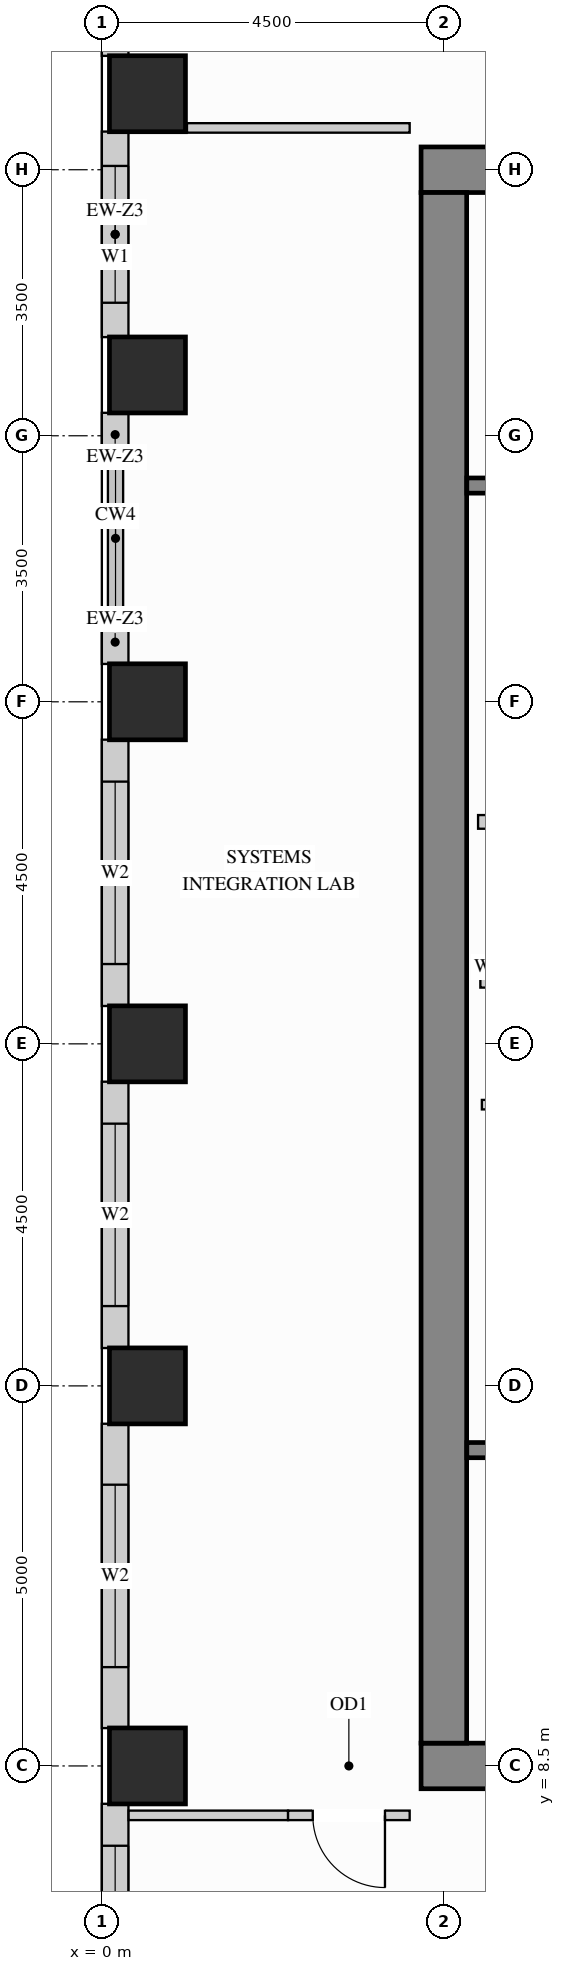
"""IFC4 building model, lengths in metres.
Left out: names, types, materials, properties, quantities, classifications, styles, units other than length and angle.
Written with IfcOpenShell. Run it as: python <this file> out.ifc"""

import sys

from ifc_helpers import new_model, si_unit, direction, frame, frame_2d, origin, origin_2d, place, context, subcontext, project, spatial, rectangle, extrude, source, transform, mapped, element, fill, save


model = new_model("IFC4")
c1 = context("Model", 3, precision=1e-05, world=origin(), true_north=direction((0.0, 1.0)))
c2 = subcontext(c1, "Body", "Model", "MODEL_VIEW")
j1 = project(units=[si_unit("LENGTHUNIT", "METRE"), si_unit("PLANEANGLEUNIT", "RADIAN")], contexts=[c1])
p1 = place(None, origin())
s1 = spatial("IfcSite", under=j1, at=p1, CompositionType="ELEMENT")
p2 = place(p1, origin())
s2 = spatial("IfcBuilding", under=s1, at=p2, CompositionType="ELEMENT")
p3 = place(p2, frame((0.0, 0.0, 143.1)))
s3 = spatial("IfcBuildingStorey", under=s2, at=p3, CompositionType="ELEMENT", Elevation=143.1)
m1 = source(origin(), c2, "Body", "SweptSolid", [
    extrude(rectangle(XDim=1.0, YDim=1.0, at=origin_2d()), origin(), (0.0, 0.0, 1.0), 3.4),
])
for number, where, z_axis, x_axis in (
    (1, (0.6, 13.5, 0.0), (0.0, 0.0, 1.0), (1.0, 0.0, 0.0)),
    (2, (0.6, 18.0, 0.0), (0.0, 0.0, 1.0), (1.0, 0.0, 0.0)),
    (3, (0.6, 22.5, 0.0), (0.0, 0.0, 1.0), (1.0, 0.0, 0.0)),
    (4, (0.6, 26.8, 0.0), (0.0, 0.0, 1.0), (1.0, 0.0, 0.0)),
    (5, (0.6, 30.5, 0.0), (0.0, 0.0, 1.0), (1.0, 0.0, 0.0)),
    (6, (0.6, 8.5, 0.0), (0.0, 0.0, 1.0), (1.0, 0.0, 0.0)),
):
    element("IfcColumn", number, at=place(p3, frame(where, z_axis=z_axis, x_axis=x_axis)), inside=s3, PredefinedType="COLUMN", context=c2, shape_type="MappedRepresentation", body=[
        mapped(m1, transform((0.0, 0.0, 0.0), x_axis=(1.0, 0.0, 0.0), y_axis=(0.0, 1.0, 0.0), z_axis=(0.0, 0.0, 1.0))),
    ])
m2 = source(origin(), c2, "Body", "SweptSolid", [
    extrude(rectangle(XDim=10.6, YDim=0.6, at=frame_2d((5.3, 0.0))), origin(), (0.0, 0.0, 1.0), 3.4),
])
for number, where, z_axis, x_axis in (
    (7, (4.2, 29.5, 0.0), (0.0, 0.0, 1.0), (1.0, 0.0, 0.0)),
    (8, (4.2, 8.5, 0.0), (0.0, 0.0, 1.0), (1.0, 0.0, 0.0)),
):
    element("IfcWall", number, at=place(p3, frame(where, z_axis=z_axis, x_axis=x_axis)), inside=s3, PredefinedType="SHEAR", context=c2, shape_type="MappedRepresentation", body=[
        mapped(m2, transform((0.0, 0.0, 0.0), x_axis=(1.0, 0.0, 0.0), y_axis=(0.0, 1.0, 0.0), z_axis=(0.0, 0.0, 1.0))),
    ])
m3 = source(origin(), c2, "Body", "SweptSolid", [
    extrude(rectangle(XDim=20.4, YDim=0.6, at=frame_2d((10.2, 0.0))), origin(), (0.0, 0.0, 1.0), 3.4),
])
p4 = place(p3, frame((4.5, 8.8, 0.0), z_axis=(0.0, 0.0, 1.0), x_axis=(0.0, 1.0, 0.0)))
e9 = element("IfcWall", 9, at=p4, inside=s3, PredefinedType="SHEAR", context=c2, shape_type="MappedRepresentation", body=[
    mapped(m3, transform((0.0, 0.0, 0.0), x_axis=(1.0, 0.0, 0.0), y_axis=(0.0, 1.0, 0.0), z_axis=(0.0, 0.0, 1.0))),
])
p5 = place(p3, frame((0.175, 34.502, 0.0), z_axis=(0.0, 0.0, 1.0), x_axis=(0.0, -1.0, 0.0)))
e10 = element("IfcWall", 10, at=p5, inside=s3, PredefinedType="SOLIDWALL", context=c2, shape_type="SweptSolid", body=[
    extrude(rectangle(XDim=3.504, YDim=0.35, at=frame_2d((1.752, 0.0))), origin(), (0.0, 0.0, 1.0), 2.612),
])
p6 = place(p5, frame((0.561, 0.0, 0.78)))
e11 = element("IfcOpeningElement", 11, at=p6, cuts=e10, PredefinedType="OPENING", context=c2, shape_type="SweptSolid", body=[
    extrude(rectangle(XDim=1.8, YDim=1.652, at=frame_2d((0.9, 0.826))), frame((0.0, 0.185, 0.0), z_axis=(0.0, -1.0, 0.0), x_axis=(1.0, 0.0, 0.0)), (0.0, 0.0, 1.0), 0.37),
])
p7 = place(p3, frame((0.175, 30.002, 0.0), z_axis=(0.0, 0.0, 1.0), x_axis=(0.0, -1.0, 0.0)))
e12 = element("IfcWall", 12, at=p7, inside=s3, PredefinedType="SOLIDWALL", context=c2, shape_type="SweptSolid", body=[
    extrude(rectangle(XDim=2.704, YDim=0.35, at=frame_2d((1.352, 0.0))), origin(), (0.0, 0.0, 1.0), 2.612),
])
p8 = place(p7, frame((0.452, 0.0, 0.78)))
e13 = element("IfcOpeningElement", 13, at=p8, cuts=e12, PredefinedType="OPENING", context=c2, shape_type="SweptSolid", body=[
    extrude(rectangle(XDim=1.8, YDim=1.652, at=frame_2d((0.9, 0.826))), frame((0.0, 0.185, 0.0), z_axis=(0.0, -1.0, 0.0), x_axis=(1.0, 0.0, 0.0)), (0.0, 0.0, 1.0), 0.37),
])
m4 = source(origin(), c2, "Body", "SweptSolid", [
    extrude(rectangle(XDim=0.452, YDim=0.35, at=frame_2d((0.226, 0.0))), origin(), (0.0, 0.0, 1.0), 2.612),
])
for number, where, z_axis, x_axis in (
    (14, (0.175, 26.302, 0.0), (0.0, 0.0, 1.0), (0.0, -1.0, 0.0)),
    (15, (0.175, 23.45, 0.0), (0.0, 0.0, 1.0), (0.0, -1.0, 0.0)),
):
    element("IfcWall", number, at=place(p3, frame(where, z_axis=z_axis, x_axis=x_axis)), inside=s3, PredefinedType="SOLIDWALL", context=c2, shape_type="MappedRepresentation", body=[
        mapped(m4, transform((0.0, 0.0, 0.0), x_axis=(1.0, 0.0, 0.0), y_axis=(0.0, 1.0, 0.0), z_axis=(0.0, 0.0, 1.0))),
    ])
p9 = place(p3, frame((0.175, 22.002, 0.0), z_axis=(0.0, 0.0, 1.0), x_axis=(0.0, -1.0, 0.0)))
e16 = element("IfcWall", 16, at=p9, inside=s3, PredefinedType="SOLIDWALL", context=c2, shape_type="SweptSolid", body=[
    extrude(rectangle(XDim=3.504, YDim=0.35, at=frame_2d((1.752, 0.0))), origin(), (0.0, 0.0, 1.0), 2.612),
])
p10 = place(p9, frame((0.552, 0.0, 0.78)))
e17 = element("IfcOpeningElement", 17, at=p10, cuts=e16, PredefinedType="OPENING", context=c2, shape_type="SweptSolid", body=[
    extrude(rectangle(XDim=2.4, YDim=1.652, at=frame_2d((1.2, 0.826))), frame((0.0, 0.185, 0.0), z_axis=(0.0, -1.0, 0.0), x_axis=(1.0, 0.0, 0.0)), (0.0, 0.0, 1.0), 0.37),
])
p11 = place(p3, frame((0.175, 17.502, 0.0), z_axis=(0.0, 0.0, 1.0), x_axis=(0.0, -1.0, 0.0)))
e18 = element("IfcWall", 18, at=p11, inside=s3, PredefinedType="SOLIDWALL", context=c2, shape_type="SweptSolid", body=[
    extrude(rectangle(XDim=3.504, YDim=0.35, at=frame_2d((1.752, 0.0))), origin(), (0.0, 0.0, 1.0), 2.612),
])
p12 = place(p11, frame((0.552, 0.0, 0.78)))
e19 = element("IfcOpeningElement", 19, at=p12, cuts=e18, PredefinedType="OPENING", context=c2, shape_type="SweptSolid", body=[
    extrude(rectangle(XDim=2.4, YDim=1.652, at=frame_2d((1.2, 0.826))), frame((0.0, 0.185, 0.0), z_axis=(0.0, -1.0, 0.0), x_axis=(1.0, 0.0, 0.0)), (0.0, 0.0, 1.0), 0.37),
])
p13 = place(p3, frame((0.175, 13.002, 0.0), z_axis=(0.0, 0.0, 1.0), x_axis=(0.0, -1.0, 0.0)))
e20 = element("IfcWall", 20, at=p13, inside=s3, PredefinedType="SOLIDWALL", context=c2, shape_type="SweptSolid", body=[
    extrude(rectangle(XDim=4.004, YDim=0.35, at=frame_2d((2.002, 0.0))), origin(), (0.0, 0.0, 1.0), 2.612),
])
p14 = place(p13, frame((0.802, 0.0, 0.78)))
e21 = element("IfcOpeningElement", 21, at=p14, cuts=e20, PredefinedType="OPENING", context=c2, shape_type="SweptSolid", body=[
    extrude(rectangle(XDim=2.4, YDim=1.652, at=frame_2d((1.2, 0.826))), frame((0.0, 0.185, 0.0), z_axis=(0.0, -1.0, 0.0), x_axis=(1.0, 0.0, 0.0)), (0.0, 0.0, 1.0), 0.37),
])
p15 = place(p3, frame((0.175, 8.002, 0.0), z_axis=(0.0, 0.0, 1.0), x_axis=(0.0, -1.0, 0.0)))
e22 = element("IfcWall", 22, at=p15, inside=s3, PredefinedType="SOLIDWALL", context=c2, shape_type="SweptSolid", body=[
    extrude(rectangle(XDim=4.004, YDim=0.35, at=frame_2d((2.002, 0.0))), origin(), (0.0, 0.0, 1.0), 2.612),
])
p16 = place(p15, frame((0.552, 0.0, 0.78)))
e23 = element("IfcOpeningElement", 23, at=p16, cuts=e22, PredefinedType="OPENING", context=c2, shape_type="SweptSolid", body=[
    extrude(rectangle(XDim=2.4, YDim=1.652, at=frame_2d((1.2, 0.826))), frame((0.0, 0.185, 0.0), z_axis=(0.0, -1.0, 0.0), x_axis=(1.0, 0.0, 0.0)), (0.0, 0.0, 1.0), 0.37),
])
m5 = source(origin(), c2, "Body", "SweptSolid", [
    extrude(rectangle(XDim=2.2, YDim=0.18, at=frame_2d((1.1, 0.0))), origin(), (0.0, 0.0, 1.0), 3.385),
])
p17 = place(p3, frame((4.95, 20.92, 0.0), z_axis=(0.0, 0.0, 1.0), x_axis=(1.0, 0.0, 0.0)))
e24 = element("IfcWall", 24, at=p17, inside=s3, PredefinedType="PARTITIONING", context=c2, shape_type="MappedRepresentation", body=[
    mapped(m5, transform((0.0, 0.0, 0.0), x_axis=(1.0, 0.0, 0.0), y_axis=(0.0, 1.0, 0.0), z_axis=(0.0, 0.0, 1.0))),
])
p18 = place(p3, frame((5.0, 17.2, 0.0), z_axis=(0.0, 0.0, 1.0), x_axis=(1.0, 0.0, 0.0)))
e25 = element("IfcWall", 25, at=p18, inside=s3, PredefinedType="PARTITIONING", context=c2, shape_type="SweptSolid", body=[
    extrude(rectangle(XDim=2.4, YDim=0.125, at=frame_2d((1.2, 0.0))), origin(), (0.0, 0.0, 1.0), 3.385),
])
p19 = place(p18, frame((0.7, 0.0, 0.0)))
e26 = element("IfcOpeningElement", 26, at=p19, cuts=e25, PredefinedType="OPENING", context=c2, shape_type="SweptSolid", body=[
    extrude(rectangle(XDim=0.85, YDim=2.1, at=frame_2d((0.425, 1.05))), frame((0.0, 0.073, 0.0), z_axis=(0.0, -1.0, 0.0), x_axis=(1.0, 0.0, 0.0)), (0.0, 0.0, 1.0), 0.145),
])
m6 = source(origin(), c2, "Body", "SweptSolid", [
    extrude(rectangle(XDim=2.93, YDim=0.125, at=frame_2d((1.465, 0.0))), origin(), (0.0, 0.0, 1.0), 3.385),
])
p20 = place(p3, frame((1.12, 30.05, 0.0), z_axis=(0.0, 0.0, 1.0), x_axis=(1.0, 0.0, 0.0)))
e27 = element("IfcWall", 27, at=p20, inside=s3, PredefinedType="PARTITIONING", context=c2, shape_type="MappedRepresentation", body=[
    mapped(m6, transform((0.0, 0.0, 0.0), x_axis=(1.0, 0.0, 0.0), y_axis=(0.0, 1.0, 0.0), z_axis=(0.0, 0.0, 1.0))),
])
m7 = source(origin(), c2, "Body", "SweptSolid", [
    extrude(rectangle(XDim=2.098, YDim=0.125, at=frame_2d((1.049, 0.0))), origin(), (0.0, 0.0, 1.0), 3.385),
])
p21 = place(p3, frame((0.352, 7.85, 0.0), z_axis=(0.0, 0.0, 1.0), x_axis=(1.0, 0.0, 0.0)))
e28 = element("IfcWall", 28, at=p21, inside=s3, PredefinedType="PARTITIONING", context=c2, shape_type="MappedRepresentation", body=[
    mapped(m7, transform((0.0, 0.0, 0.0), x_axis=(1.0, 0.0, 0.0), y_axis=(0.0, 1.0, 0.0), z_axis=(0.0, 0.0, 1.0))),
])
p22 = place(p3, frame((2.45, 7.85, 0.0), z_axis=(0.0, 0.0, 1.0), x_axis=(1.0, 0.0, 0.0)))
e29 = element("IfcWall", 29, at=p22, inside=s3, PredefinedType="PARTITIONING", context=c2, shape_type="SweptSolid", body=[
    extrude(rectangle(XDim=1.6, YDim=0.125, at=frame_2d((0.8, 0.0))), origin(), (0.0, 0.0, 1.0), 3.385),
])
p23 = place(p22, frame((0.325, 0.0, 0.0)))
e30 = element("IfcOpeningElement", 30, at=p23, cuts=e29, PredefinedType="OPENING", context=c2, shape_type="SweptSolid", body=[
    extrude(rectangle(XDim=0.95, YDim=2.15, at=frame_2d((0.475, 1.075))), frame((0.0, 0.073, 0.0), z_axis=(0.0, -1.0, 0.0), x_axis=(1.0, 0.0, 0.0)), (0.0, 0.0, 1.0), 0.145),
])
m8 = source(origin(), c2, "Body", "SweptSolid", [
    extrude(rectangle(XDim=2.09, YDim=0.2, at=frame_2d((1.045, 0.0))), origin(), (0.0, 0.0, 1.0), 3.385),
])
p24 = place(p3, frame((4.98, 18.84, 0.0), z_axis=(0.0, 0.0, 1.0), x_axis=(1.0, 0.0, 0.0)))
e31 = element("IfcWall", 31, at=p24, inside=s3, PredefinedType="PARTITIONING", context=c2, shape_type="MappedRepresentation", body=[
    mapped(m8, transform((0.0, 0.0, 0.0), x_axis=(1.0, 0.0, 0.0), y_axis=(0.0, 1.0, 0.0), z_axis=(0.0, 0.0, 1.0))),
])
p25 = place(p3, frame((4.802, 12.655, 0.0), z_axis=(0.0, 0.0, 1.0), x_axis=(1.0, 0.0, 0.0)))
e32 = element("IfcWall", 32, at=p25, inside=s3, PredefinedType="SHEAR", context=c2, shape_type="SweptSolid", body=[
    extrude(rectangle(XDim=7.603, YDim=0.2, at=frame_2d((3.802, 0.0))), origin(), (0.0, 0.0, 1.0), 3.4),
])
p26 = place(p25, frame((0.4, 0.0, 0.0)))
e33 = element("IfcOpeningElement", 33, at=p26, cuts=e32, PredefinedType="OPENING", context=c2, shape_type="SweptSolid", body=[
    extrude(rectangle(XDim=1.1, YDim=2.15, at=frame_2d((0.55, 1.075))), frame((0.0, 0.11, 0.0), z_axis=(0.0, -1.0, 0.0), x_axis=(1.0, 0.0, 0.0)), (0.0, 0.0, 1.0), 0.22),
])
p27 = place(p3, frame((4.802, 25.345, 0.0), z_axis=(0.0, 0.0, 1.0), x_axis=(1.0, 0.0, 0.0)))
e34 = element("IfcWall", 34, at=p27, inside=s3, PredefinedType="SHEAR", context=c2, shape_type="SweptSolid", body=[
    extrude(rectangle(XDim=7.603, YDim=0.2, at=frame_2d((3.802, 0.0))), origin(), (0.0, 0.0, 1.0), 3.4),
])
p28 = place(p27, frame((0.4, 0.0, 0.0)))
e35 = element("IfcOpeningElement", 35, at=p28, cuts=e34, PredefinedType="OPENING", context=c2, shape_type="SweptSolid", body=[
    extrude(rectangle(XDim=1.1, YDim=2.15, at=frame_2d((0.55, 1.075))), frame((0.0, 0.11, 0.0), z_axis=(0.0, -1.0, 0.0), x_axis=(1.0, 0.0, 0.0)), (0.0, 0.0, 1.0), 0.22),
])
m9 = source(origin(), c2, "Body", "SweptSolid", [
    extrude(rectangle(XDim=0.95, YDim=2.15, at=frame_2d((0.475, 1.075))), frame((0.0, 0.025, 0.0), z_axis=(0.0, -1.0, 0.0), x_axis=(1.0, 0.0, 0.0)), (0.0, 0.0, 1.0), 0.05),
])
p29 = place(p23, origin())
e36 = element("IfcDoor", 36, at=p29, inside=s3, OperationType="SINGLE_SWING_RIGHT", PredefinedType="DOOR", context=c2, shape_type="MappedRepresentation", body=[
    mapped(m9, transform((0.0, 0.0, 0.0), x_axis=(1.0, 0.0, 0.0), y_axis=(0.0, 1.0, 0.0), z_axis=(0.0, 0.0, 1.0))),
])
fill(e30, e36)
m10 = source(origin(), c2, "Body", "SweptSolid", [
    extrude(rectangle(XDim=1.8, YDim=1.652, at=frame_2d((0.9, 0.826))), frame((0.0, 0.03, 0.0), z_axis=(0.0, -1.0, 0.0), x_axis=(1.0, 0.0, 0.0)), (0.0, 0.0, 1.0), 0.06),
])
p30 = place(p8, origin())
e37 = element("IfcWindow", 37, at=p30, inside=s3, PartitioningType="SINGLE_PANEL", PredefinedType="WINDOW", context=c2, shape_type="MappedRepresentation", body=[
    mapped(m10, transform((0.0, 0.0, 0.0), x_axis=(1.0, 0.0, 0.0), y_axis=(0.0, 1.0, 0.0), z_axis=(0.0, 0.0, 1.0))),
])
fill(e13, e37)
m11 = source(origin(), c2, "Body", "SweptSolid", [
    extrude(rectangle(XDim=2.4, YDim=1.652, at=frame_2d((1.2, 0.826))), frame((0.0, 0.03, 0.0), z_axis=(0.0, -1.0, 0.0), x_axis=(1.0, 0.0, 0.0)), (0.0, 0.0, 1.0), 0.06),
])
p31 = place(p10, origin())
e38 = element("IfcWindow", 38, at=p31, inside=s3, PartitioningType="SINGLE_PANEL", PredefinedType="WINDOW", context=c2, shape_type="MappedRepresentation", body=[
    mapped(m11, transform((0.0, 0.0, 0.0), x_axis=(1.0, 0.0, 0.0), y_axis=(0.0, 1.0, 0.0), z_axis=(0.0, 0.0, 1.0))),
])
fill(e17, e38)
p32 = place(p12, origin())
e39 = element("IfcWindow", 39, at=p32, inside=s3, PartitioningType="SINGLE_PANEL", PredefinedType="WINDOW", context=c2, shape_type="MappedRepresentation", body=[
    mapped(m11, transform((0.0, 0.0, 0.0), x_axis=(1.0, 0.0, 0.0), y_axis=(0.0, 1.0, 0.0), z_axis=(0.0, 0.0, 1.0))),
])
fill(e19, e39)
p33 = place(p14, origin())
e40 = element("IfcWindow", 40, at=p33, inside=s3, PartitioningType="SINGLE_PANEL", PredefinedType="WINDOW", context=c2, shape_type="MappedRepresentation", body=[
    mapped(m11, transform((0.0, 0.0, 0.0), x_axis=(1.0, 0.0, 0.0), y_axis=(0.0, 1.0, 0.0), z_axis=(0.0, 0.0, 1.0))),
])
fill(e21, e40)
p34 = place(p16, origin())
e41 = element("IfcWindow", 41, at=p34, inside=s3, PartitioningType="SINGLE_PANEL", PredefinedType="WINDOW", context=c2, shape_type="MappedRepresentation", body=[
    mapped(m11, transform((0.0, 0.0, 0.0), x_axis=(1.0, 0.0, 0.0), y_axis=(0.0, 1.0, 0.0), z_axis=(0.0, 0.0, 1.0))),
])
fill(e23, e41)
save(model, sys.argv[1])
